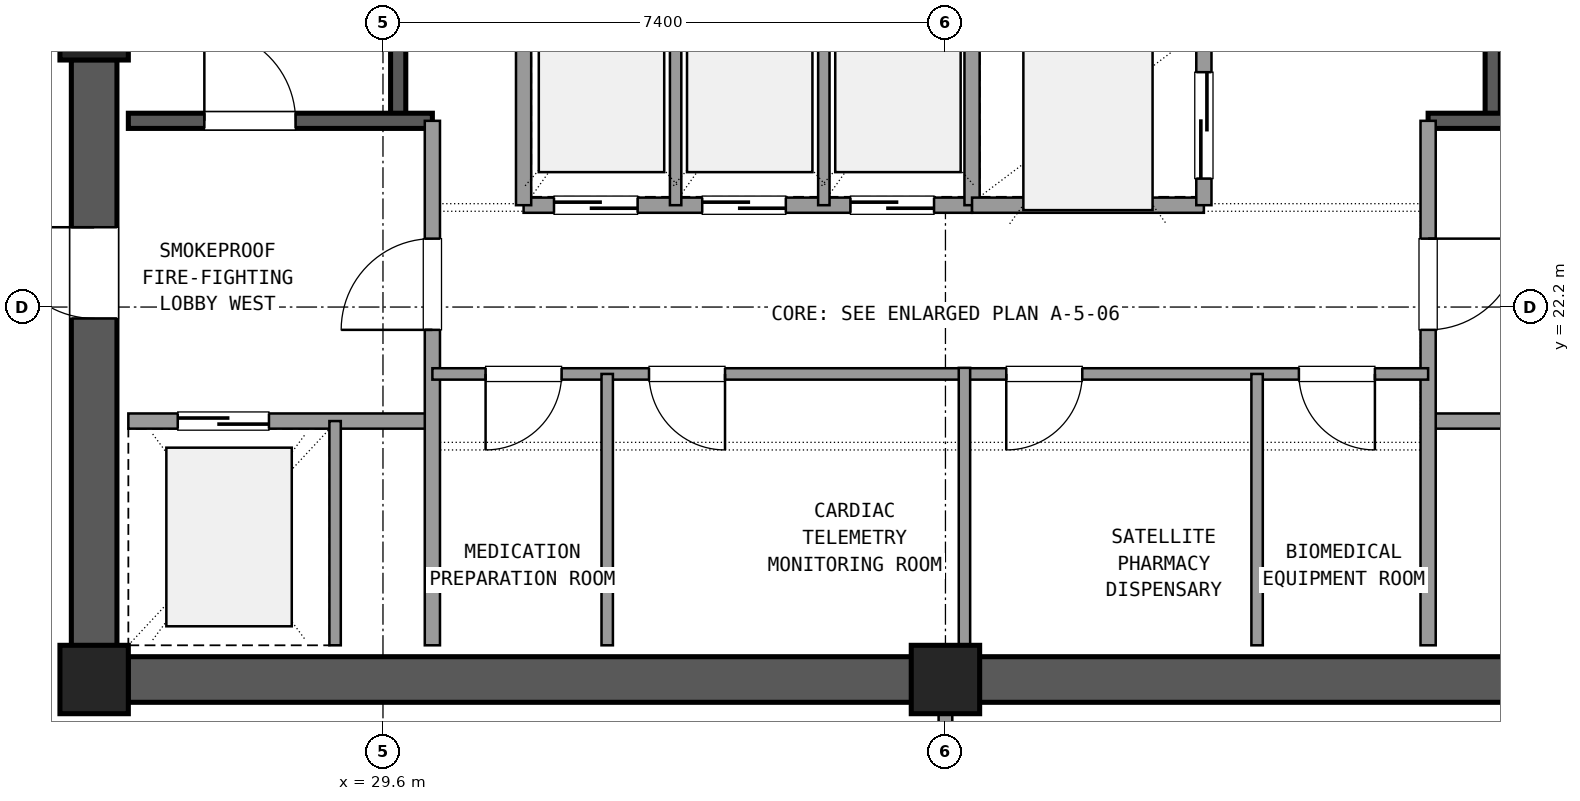
"""IFC4 building model, lengths in metres.
Left out: names, types, materials, properties, quantities, classifications, styles, units other than length and angle.
Written with IfcOpenShell. Run it as: python <this file> out.ifc"""

import sys

from ifc_helpers import new_model, si_unit, direction, frame, frame_2d, origin, origin_2d, place, context, subcontext, project, spatial, rectangle, extrude, element, fill, save


model = new_model("IFC4")
c1 = context("Model", 3, precision=1e-05, world=origin(), true_north=direction((0.0, 1.0)))
c2 = subcontext(c1, "Body", "Model", "MODEL_VIEW")
j1 = project(units=[si_unit("LENGTHUNIT", "METRE"), si_unit("PLANEANGLEUNIT", "RADIAN")], contexts=[c1])
p1 = place(None, origin())
s1 = spatial("IfcSite", under=j1, at=p1, CompositionType="ELEMENT")
p2 = place(p1, origin())
s2 = spatial("IfcBuilding", under=s1, at=p2, CompositionType="ELEMENT")
p3 = place(p2, frame((0.0, 0.0, 214.38)))
s3 = spatial("IfcBuildingStorey", under=s2, at=p3, CompositionType="ELEMENT", Elevation=214.38)
for number, where, z_axis, x_axis in (
    (1, (25.8, 17.3, 0.0), (0.0, 0.0, 1.0), (1.0, 0.0, 0.0)),
    (2, (37.0, 17.3, 0.0), (0.0, 0.0, 1.0), (1.0, 0.0, 0.0)),
    (3, (25.8, 25.9, 0.0), (0.0, 0.0, 1.0), (1.0, 0.0, 0.0)),
):
    element("IfcColumn", number, at=place(p3, frame(where, z_axis=z_axis, x_axis=x_axis)), inside=s3, PredefinedType="COLUMN", context=c2, shape_type="SweptSolid", body=[
        extrude(rectangle(XDim=0.9, YDim=0.9, at=origin_2d()), origin(), (0.0, 0.0, 1.0), 3.6),
    ])
for number, where, z_axis, x_axis in (
    (4, (26.245, 17.3, 0.0), (0.0, 0.0, 1.0), (1.0, 0.0, 0.0)),
    (5, (37.445, 17.3, 0.0), (0.0, 0.0, 1.0), (1.0, 0.0, 0.0)),
):
    element("IfcWall", number, at=place(p3, frame(where, z_axis=z_axis, x_axis=x_axis)), inside=s3, PredefinedType="SHEAR", context=c2, shape_type="SweptSolid", body=[
        extrude(rectangle(XDim=10.31, YDim=0.6, at=frame_2d((5.155, 0.0))), origin(), (0.0, 0.0, 1.0), 3.32),
    ])
p4 = place(p3, frame((25.8, 25.455, 0.0), z_axis=(0.0, 0.0, 1.0), x_axis=(0.0, -1.0, 0.0)))
e6 = element("IfcWall", 6, at=p4, inside=s3, PredefinedType="SHEAR", context=c2, shape_type="SweptSolid", body=[
    extrude(rectangle(XDim=7.71, YDim=0.6, at=frame_2d((3.855, 0.0))), origin(), (0.0, 0.0, 1.0), 3.32),
])
p5 = place(p4, frame((2.205, 0.0, 0.0)))
e7 = element("IfcOpeningElement", 7, at=p5, cuts=e6, PredefinedType="OPENING", context=c2, shape_type="SweptSolid", body=[
    extrude(rectangle(XDim=1.2, YDim=2.15, at=frame_2d((0.6, 1.075))), frame((0.0, 0.31, 0.0), z_axis=(0.0, -1.0, 0.0), x_axis=(1.0, 0.0, 0.0)), (0.0, 0.0, 1.0), 0.62),
])
p6 = place(p3, frame((29.8, 24.65, 0.0), z_axis=(0.0, 0.0, 1.0), x_axis=(0.0, 1.0, 0.0)))
e8 = element("IfcWall", 8, at=p6, inside=s3, PredefinedType="SHEAR", context=c2, shape_type="SweptSolid", body=[
    extrude(rectangle(XDim=9.4, YDim=0.2, at=frame_2d((4.7, 0.0))), origin(), (0.0, 0.0, 1.0), 3.32),
])
p7 = place(p3, frame((26.25, 24.65, 0.0), z_axis=(0.0, 0.0, 1.0), x_axis=(1.0, 0.0, 0.0)))
e9 = element("IfcWall", 9, at=p7, inside=s3, PredefinedType="SHEAR", context=c2, shape_type="SweptSolid", body=[
    extrude(rectangle(XDim=4.0, YDim=0.2, at=frame_2d((2.0, 0.0))), origin(), (0.0, 0.0, 1.0), 3.32),
])
p8 = place(p7, frame((1.0, 0.0, 0.0)))
e10 = element("IfcOpeningElement", 10, at=p8, cuts=e9, PredefinedType="OPENING", context=c2, shape_type="SweptSolid", body=[
    extrude(rectangle(XDim=1.2, YDim=2.15, at=frame_2d((0.6, 1.075))), frame((0.0, 0.11, 0.0), z_axis=(0.0, -1.0, 0.0), x_axis=(1.0, 0.0, 0.0)), (0.0, 0.0, 1.0), 0.22),
])
p9 = place(p3, frame((44.2, 24.65, 0.0), z_axis=(0.0, 0.0, 1.0), x_axis=(0.0, 1.0, 0.0)))
e11 = element("IfcWall", 11, at=p9, inside=s3, PredefinedType="SHEAR", context=c2, shape_type="SweptSolid", body=[
    extrude(rectangle(XDim=9.4, YDim=0.2, at=frame_2d((4.7, 0.0))), origin(), (0.0, 0.0, 1.0), 3.32),
])
p10 = place(p3, frame((43.35, 24.65, 0.0), z_axis=(0.0, 0.0, 1.0), x_axis=(1.0, 0.0, 0.0)))
e12 = element("IfcWall", 12, at=p10, inside=s3, PredefinedType="SHEAR", context=c2, shape_type="SweptSolid", body=[
    extrude(rectangle(XDim=4.4, YDim=0.2, at=frame_2d((2.2, 0.0))), origin(), (0.0, 0.0, 1.0), 3.32),
])
p11 = place(p10, frame((2.0, 0.0, 0.0)))
e13 = element("IfcOpeningElement", 13, at=p11, cuts=e12, PredefinedType="OPENING", context=c2, shape_type="SweptSolid", body=[
    extrude(rectangle(XDim=1.2, YDim=2.15, at=frame_2d((0.6, 1.075))), frame((0.0, 0.11, 0.0), z_axis=(0.0, -1.0, 0.0), x_axis=(1.0, 0.0, 0.0)), (0.0, 0.0, 1.0), 0.22),
])
p12 = place(p3, frame((26.25, 20.7, 0.0), z_axis=(0.0, 0.0, 1.0), x_axis=(1.0, 0.0, 0.0)))
e14 = element("IfcWall", 14, at=p12, inside=s3, PredefinedType="SOLIDWALL", context=c2, shape_type="SweptSolid", body=[
    extrude(rectangle(XDim=4.0, YDim=0.2, at=frame_2d((2.0, 0.0))), origin(), (0.0, 0.0, 1.0), 2.61),
])
p13 = place(p12, frame((0.65, 0.0, 0.0)))
e15 = element("IfcOpeningElement", 15, at=p13, cuts=e14, PredefinedType="OPENING", context=c2, shape_type="SweptSolid", body=[
    extrude(rectangle(XDim=1.2, YDim=2.15, at=frame_2d((0.6, 1.075))), frame((0.0, 0.11, 0.0), z_axis=(0.0, -1.0, 0.0), x_axis=(1.0, 0.0, 0.0)), (0.0, 0.0, 1.0), 0.22),
])
p14 = place(p3, frame((30.25, 17.75, 0.0), z_axis=(0.0, 0.0, 1.0), x_axis=(0.0, 1.0, 0.0)))
e16 = element("IfcWall", 16, at=p14, inside=s3, PredefinedType="SOLIDWALL", context=c2, shape_type="SweptSolid", body=[
    extrude(rectangle(XDim=6.9, YDim=0.2, at=frame_2d((3.45, 0.0))), origin(), (0.0, 0.0, 1.0), 2.61),
])
p15 = place(p14, frame((4.15, 0.0, 0.0)))
e17 = element("IfcOpeningElement", 17, at=p15, cuts=e16, PredefinedType="OPENING", context=c2, shape_type="SweptSolid", body=[
    extrude(rectangle(XDim=1.2, YDim=2.15, at=frame_2d((0.6, 1.075))), frame((0.0, 0.11, 0.0), z_axis=(0.0, -1.0, 0.0), x_axis=(1.0, 0.0, 0.0)), (0.0, 0.0, 1.0), 0.22),
])
p16 = place(p3, frame((28.97, 17.75, 0.0), z_axis=(0.0, 0.0, 1.0), x_axis=(0.0, 1.0, 0.0)))
e18 = element("IfcWall", 18, at=p16, inside=s3, PredefinedType="PARTITIONING", context=c2, shape_type="SweptSolid", body=[
    extrude(rectangle(XDim=2.95, YDim=0.15, at=frame_2d((1.475, 0.0))), origin(), (0.0, 0.0, 1.0), 2.61),
])
p17 = place(p3, frame((43.35, 20.7, 0.0), z_axis=(0.0, 0.0, 1.0), x_axis=(1.0, 0.0, 0.0)))
e19 = element("IfcWall", 19, at=p17, inside=s3, PredefinedType="SOLIDWALL", context=c2, shape_type="SweptSolid", body=[
    extrude(rectangle(XDim=4.4, YDim=0.2, at=frame_2d((2.2, 0.0))), origin(), (0.0, 0.0, 1.0), 2.61),
])
p18 = place(p17, frame((2.35, 0.0, 0.0)))
e20 = element("IfcOpeningElement", 20, at=p18, cuts=e19, PredefinedType="OPENING", context=c2, shape_type="SweptSolid", body=[
    extrude(rectangle(XDim=1.2, YDim=2.15, at=frame_2d((0.6, 1.075))), frame((0.0, 0.11, 0.0), z_axis=(0.0, -1.0, 0.0), x_axis=(1.0, 0.0, 0.0)), (0.0, 0.0, 1.0), 0.22),
])
p19 = place(p3, frame((43.35, 17.75, 0.0), z_axis=(0.0, 0.0, 1.0), x_axis=(0.0, 1.0, 0.0)))
e21 = element("IfcWall", 21, at=p19, inside=s3, PredefinedType="SOLIDWALL", context=c2, shape_type="SweptSolid", body=[
    extrude(rectangle(XDim=6.9, YDim=0.2, at=frame_2d((3.45, 0.0))), origin(), (0.0, 0.0, 1.0), 2.61),
])
p20 = place(p19, frame((4.15, 0.0, 0.0)))
e22 = element("IfcOpeningElement", 22, at=p20, cuts=e21, PredefinedType="OPENING", context=c2, shape_type="SweptSolid", body=[
    extrude(rectangle(XDim=1.2, YDim=2.15, at=frame_2d((0.6, 1.075))), frame((0.0, 0.11, 0.0), z_axis=(0.0, -1.0, 0.0), x_axis=(1.0, 0.0, 0.0)), (0.0, 0.0, 1.0), 0.22),
])
p21 = place(p3, frame((30.25, 21.32, 0.0), z_axis=(0.0, 0.0, 1.0), x_axis=(1.0, 0.0, 0.0)))
e23 = element("IfcWall", 23, at=p21, inside=s3, PredefinedType="PARTITIONING", context=c2, shape_type="SweptSolid", body=[
    extrude(rectangle(XDim=7.0, YDim=0.15, at=frame_2d((3.5, 0.0))), origin(), (0.0, 0.0, 1.0), 2.61),
])
p22 = place(p21, frame((0.7, 0.0, 0.0)))
e24 = element("IfcOpeningElement", 24, at=p22, cuts=e23, PredefinedType="OPENING", context=c2, shape_type="SweptSolid", body=[
    extrude(rectangle(XDim=1.0, YDim=2.15, at=frame_2d((0.5, 1.075))), frame((0.0, 0.085, 0.0), z_axis=(0.0, -1.0, 0.0), x_axis=(1.0, 0.0, 0.0)), (0.0, 0.0, 1.0), 0.17),
])
p23 = place(p21, frame((2.85, 0.0, 0.0)))
e25 = element("IfcOpeningElement", 25, at=p23, cuts=e23, PredefinedType="OPENING", context=c2, shape_type="SweptSolid", body=[
    extrude(rectangle(XDim=1.0, YDim=2.15, at=frame_2d((0.5, 1.075))), frame((0.0, 0.085, 0.0), z_axis=(0.0, -1.0, 0.0), x_axis=(1.0, 0.0, 0.0)), (0.0, 0.0, 1.0), 0.17),
])
p24 = place(p3, frame((32.55, 17.75, 0.0), z_axis=(0.0, 0.0, 1.0), x_axis=(0.0, 1.0, 0.0)))
e26 = element("IfcWall", 26, at=p24, inside=s3, PredefinedType="PARTITIONING", context=c2, shape_type="SweptSolid", body=[
    extrude(rectangle(XDim=3.57, YDim=0.15, at=frame_2d((1.785, 0.0))), origin(), (0.0, 0.0, 1.0), 2.61),
])
p25 = place(p3, frame((37.25, 21.32, 0.0), z_axis=(0.0, 0.0, 1.0), x_axis=(1.0, 0.0, 0.0)))
e27 = element("IfcWall", 27, at=p25, inside=s3, PredefinedType="PARTITIONING", context=c2, shape_type="SweptSolid", body=[
    extrude(rectangle(XDim=6.1, YDim=0.15, at=frame_2d((3.05, 0.0))), origin(), (0.0, 0.0, 1.0), 2.61),
])
p26 = place(p25, frame((0.55, 0.0, 0.0)))
e28 = element("IfcOpeningElement", 28, at=p26, cuts=e27, PredefinedType="OPENING", context=c2, shape_type="SweptSolid", body=[
    extrude(rectangle(XDim=1.0, YDim=2.15, at=frame_2d((0.5, 1.075))), frame((0.0, 0.085, 0.0), z_axis=(0.0, -1.0, 0.0), x_axis=(1.0, 0.0, 0.0)), (0.0, 0.0, 1.0), 0.17),
])
p27 = place(p25, frame((4.4, 0.0, 0.0)))
e29 = element("IfcOpeningElement", 29, at=p27, cuts=e27, PredefinedType="OPENING", context=c2, shape_type="SweptSolid", body=[
    extrude(rectangle(XDim=1.0, YDim=2.15, at=frame_2d((0.5, 1.075))), frame((0.0, 0.085, 0.0), z_axis=(0.0, -1.0, 0.0), x_axis=(1.0, 0.0, 0.0)), (0.0, 0.0, 1.0), 0.17),
])
p28 = place(p3, frame((41.1, 17.75, 0.0), z_axis=(0.0, 0.0, 1.0), x_axis=(0.0, 1.0, 0.0)))
e30 = element("IfcWall", 30, at=p28, inside=s3, PredefinedType="PARTITIONING", context=c2, shape_type="SweptSolid", body=[
    extrude(rectangle(XDim=3.57, YDim=0.15, at=frame_2d((1.785, 0.0))), origin(), (0.0, 0.0, 1.0), 2.61),
])
p29 = place(p3, frame((37.25, 17.75, 0.0), z_axis=(0.0, 0.0, 1.0), x_axis=(0.0, 1.0, 0.0)))
e31 = element("IfcWall", 31, at=p29, inside=s3, PredefinedType="PARTITIONING", context=c2, shape_type="SweptSolid", body=[
    extrude(rectangle(XDim=3.65, YDim=0.15, at=frame_2d((1.825, 0.0))), origin(), (0.0, 0.0, 1.0), 2.61),
])
p30 = place(p3, frame((31.45, 23.54, 0.0), z_axis=(0.0, 0.0, 1.0), x_axis=(1.0, 0.0, 0.0)))
e32 = element("IfcWall", 32, at=p30, inside=s3, PredefinedType="SOLIDWALL", context=c2, shape_type="SweptSolid", body=[
    extrude(rectangle(XDim=5.9, YDim=0.2, at=frame_2d((2.95, 0.0))), origin(), (0.0, 0.0, 1.0), 2.61),
])
p31 = place(p30, frame((0.4, 0.0, 0.0)))
e33 = element("IfcOpeningElement", 33, at=p31, cuts=e32, PredefinedType="OPENING", context=c2, shape_type="SweptSolid", body=[
    extrude(rectangle(XDim=1.1, YDim=2.15, at=frame_2d((0.55, 1.075))), frame((0.0, 0.11, 0.0), z_axis=(0.0, -1.0, 0.0), x_axis=(1.0, 0.0, 0.0)), (0.0, 0.0, 1.0), 0.22),
])
p32 = place(p30, frame((2.35, 0.0, 0.0)))
e34 = element("IfcOpeningElement", 34, at=p32, cuts=e32, PredefinedType="OPENING", context=c2, shape_type="SweptSolid", body=[
    extrude(rectangle(XDim=1.1, YDim=2.15, at=frame_2d((0.55, 1.075))), frame((0.0, 0.11, 0.0), z_axis=(0.0, -1.0, 0.0), x_axis=(1.0, 0.0, 0.0)), (0.0, 0.0, 1.0), 0.22),
])
p33 = place(p30, frame((4.3, 0.0, 0.0)))
e35 = element("IfcOpeningElement", 35, at=p33, cuts=e32, PredefinedType="OPENING", context=c2, shape_type="SweptSolid", body=[
    extrude(rectangle(XDim=1.1, YDim=2.15, at=frame_2d((0.55, 1.075))), frame((0.0, 0.11, 0.0), z_axis=(0.0, -1.0, 0.0), x_axis=(1.0, 0.0, 0.0)), (0.0, 0.0, 1.0), 0.22),
])
p34 = place(p3, frame((31.45, 23.54, 0.0), z_axis=(0.0, 0.0, 1.0), x_axis=(0.0, 1.0, 0.0)))
e36 = element("IfcWall", 36, at=p34, inside=s3, PredefinedType="SOLIDWALL", context=c2, shape_type="SweptSolid", body=[
    extrude(rectangle(XDim=2.81, YDim=0.2, at=frame_2d((1.405, 0.0))), origin(), (0.0, 0.0, 1.0), 2.61),
])
for number, where, z_axis, x_axis in (
    (37, (33.45, 23.54, 0.0), (0.0, 0.0, 1.0), (0.0, 1.0, 0.0)),
    (38, (35.4, 23.54, 0.0), (0.0, 0.0, 1.0), (0.0, 1.0, 0.0)),
):
    element("IfcWall", number, at=place(p3, frame(where, z_axis=z_axis, x_axis=x_axis)), inside=s3, PredefinedType="PARTITIONING", context=c2, shape_type="SweptSolid", body=[
        extrude(rectangle(XDim=2.81, YDim=0.15, at=frame_2d((1.405, 0.0))), origin(), (0.0, 0.0, 1.0), 2.61),
    ])
p35 = place(p3, frame((37.35, 23.54, 0.0), z_axis=(0.0, 0.0, 1.0), x_axis=(0.0, 1.0, 0.0)))
e39 = element("IfcWall", 39, at=p35, inside=s3, PredefinedType="SOLIDWALL", context=c2, shape_type="SweptSolid", body=[
    extrude(rectangle(XDim=6.82, YDim=0.2, at=frame_2d((3.41, 0.0))), origin(), (0.0, 0.0, 1.0), 2.61),
])
p36 = place(p3, frame((37.35, 23.54, 0.0), z_axis=(0.0, 0.0, 1.0), x_axis=(1.0, 0.0, 0.0)))
e40 = element("IfcWall", 40, at=p36, inside=s3, PredefinedType="SOLIDWALL", context=c2, shape_type="SweptSolid", body=[
    extrude(rectangle(XDim=3.05, YDim=0.2, at=frame_2d((1.525, 0.0))), origin(), (0.0, 0.0, 1.0), 2.61),
])
p37 = place(p3, frame((40.4, 23.54, 0.0), z_axis=(0.0, 0.0, 1.0), x_axis=(0.0, 1.0, 0.0)))
e41 = element("IfcWall", 41, at=p37, inside=s3, PredefinedType="SOLIDWALL", context=c2, shape_type="SweptSolid", body=[
    extrude(rectangle(XDim=6.82, YDim=0.2, at=frame_2d((3.41, 0.0))), origin(), (0.0, 0.0, 1.0), 2.61),
])
p38 = place(p37, frame((0.35, 0.0, 0.0)))
e42 = element("IfcOpeningElement", 42, at=p38, cuts=e41, PredefinedType="OPENING", context=c2, shape_type="SweptSolid", body=[
    extrude(rectangle(XDim=1.4, YDim=2.2, at=frame_2d((0.7, 1.1))), frame((0.0, 0.11, 0.0), z_axis=(0.0, -1.0, 0.0), x_axis=(1.0, 0.0, 0.0)), (0.0, 0.0, 1.0), 0.22),
])
p39 = place(p37, frame((2.65, 0.0, 0.0)))
e43 = element("IfcOpeningElement", 43, at=p39, cuts=e41, PredefinedType="OPENING", context=c2, shape_type="SweptSolid", body=[
    extrude(rectangle(XDim=1.4, YDim=2.2, at=frame_2d((0.7, 1.1))), frame((0.0, 0.11, 0.0), z_axis=(0.0, -1.0, 0.0), x_axis=(1.0, 0.0, 0.0)), (0.0, 0.0, 1.0), 0.22),
])
p40 = place(p37, frame((4.85, 0.0, 0.0)))
e44 = element("IfcOpeningElement", 44, at=p40, cuts=e41, PredefinedType="OPENING", context=c2, shape_type="SweptSolid", body=[
    extrude(rectangle(XDim=1.4, YDim=2.2, at=frame_2d((0.7, 1.1))), frame((0.0, 0.11, 0.0), z_axis=(0.0, -1.0, 0.0), x_axis=(1.0, 0.0, 0.0)), (0.0, 0.0, 1.0), 0.22),
])
p41 = place(p3, frame((37.0, 14.15, 0.0), z_axis=(0.0, 0.0, 1.0), x_axis=(0.0, 1.0, 0.0)))
e45 = element("IfcWall", 45, at=p41, inside=s3, PredefinedType="PARTITIONING", context=c2, shape_type="SweptSolid", body=[
    extrude(rectangle(XDim=2.7, YDim=0.18, at=frame_2d((1.35, 0.0))), origin(), (0.0, 0.0, 1.0), 2.61),
])
p42 = place(p41, frame((0.35, 0.0, 0.0)))
e46 = element("IfcOpeningElement", 46, at=p42, cuts=e45, PredefinedType="OPENING", context=c2, shape_type="SweptSolid", body=[
    extrude(rectangle(XDim=2.0, YDim=2.2, at=frame_2d((1.0, 1.1))), frame((0.0, 0.1, 0.0), z_axis=(0.0, -1.0, 0.0), x_axis=(1.0, 0.0, 0.0)), (0.0, 0.0, 1.0), 0.2),
])
p43 = place(p8, origin())
e47 = element("IfcDoor", 47, at=p43, inside=s3, OperationType="SINGLE_SWING_LEFT", PredefinedType="DOOR", context=c2, shape_type="SweptSolid", body=[
    extrude(rectangle(XDim=1.2, YDim=2.15, at=frame_2d((0.6, 1.075))), frame((0.0, 0.025, 0.0), z_axis=(0.0, -1.0, 0.0), x_axis=(1.0, 0.0, 0.0)), (0.0, 0.0, 1.0), 0.05),
])
fill(e10, e47)
p44 = place(p13, origin())
e48 = element("IfcDoor", 48, at=p44, inside=s3, OperationType="SLIDING_TO_LEFT", PredefinedType="DOOR", context=c2, shape_type="SweptSolid", body=[
    extrude(rectangle(XDim=1.2, YDim=2.15, at=frame_2d((0.6, 1.075))), frame((0.0, 0.025, 0.0), z_axis=(0.0, -1.0, 0.0), x_axis=(1.0, 0.0, 0.0)), (0.0, 0.0, 1.0), 0.05),
])
fill(e15, e48)
p45 = place(p15, origin())
e49 = element("IfcDoor", 49, at=p45, inside=s3, OperationType="SINGLE_SWING_LEFT", PredefinedType="DOOR", context=c2, shape_type="SweptSolid", body=[
    extrude(rectangle(XDim=1.2, YDim=2.15, at=frame_2d((0.6, 1.075))), frame((0.0, 0.025, 0.0), z_axis=(0.0, -1.0, 0.0), x_axis=(1.0, 0.0, 0.0)), (0.0, 0.0, 1.0), 0.05),
])
fill(e17, e49)
p46 = place(p20, frame((1.2, 0.0, 0.0), z_axis=(0.0, 0.0, 1.0), x_axis=(-1.0, 0.0, 0.0)))
e50 = element("IfcDoor", 50, at=p46, inside=s3, OperationType="SINGLE_SWING_RIGHT", PredefinedType="DOOR", context=c2, shape_type="SweptSolid", body=[
    extrude(rectangle(XDim=1.2, YDim=2.15, at=frame_2d((0.6, 1.075))), frame((0.0, 0.025, 0.0), z_axis=(0.0, -1.0, 0.0), x_axis=(1.0, 0.0, 0.0)), (0.0, 0.0, 1.0), 0.05),
])
fill(e22, e50)
p47 = place(p5, frame((1.2, 0.0, 0.0), z_axis=(0.0, 0.0, 1.0), x_axis=(-1.0, 0.0, 0.0)))
e51 = element("IfcDoor", 51, at=p47, inside=s3, OperationType="SINGLE_SWING_LEFT", PredefinedType="DOOR", context=c2, shape_type="SweptSolid", body=[
    extrude(rectangle(XDim=1.2, YDim=2.15, at=frame_2d((0.6, 1.075))), frame((0.0, 0.025, 0.0), z_axis=(0.0, -1.0, 0.0), x_axis=(1.0, 0.0, 0.0)), (0.0, 0.0, 1.0), 0.05),
])
fill(e7, e51)
p48 = place(p22, frame((1.0, 0.0, 0.0), z_axis=(0.0, 0.0, 1.0), x_axis=(-1.0, 0.0, 0.0)))
e52 = element("IfcDoor", 52, at=p48, inside=s3, OperationType="SINGLE_SWING_LEFT", PredefinedType="DOOR", context=c2, shape_type="SweptSolid", body=[
    extrude(rectangle(XDim=1.0, YDim=2.15, at=frame_2d((0.5, 1.075))), frame((0.0, 0.025, 0.0), z_axis=(0.0, -1.0, 0.0), x_axis=(1.0, 0.0, 0.0)), (0.0, 0.0, 1.0), 0.05),
])
fill(e24, e52)
p49 = place(p23, frame((1.0, 0.0, 0.0), z_axis=(0.0, 0.0, 1.0), x_axis=(-1.0, 0.0, 0.0)))
e53 = element("IfcDoor", 53, at=p49, inside=s3, OperationType="SINGLE_SWING_RIGHT", PredefinedType="DOOR", context=c2, shape_type="SweptSolid", body=[
    extrude(rectangle(XDim=1.0, YDim=2.15, at=frame_2d((0.5, 1.075))), frame((0.0, 0.025, 0.0), z_axis=(0.0, -1.0, 0.0), x_axis=(1.0, 0.0, 0.0)), (0.0, 0.0, 1.0), 0.05),
])
fill(e25, e53)
p50 = place(p26, frame((1.0, 0.0, 0.0), z_axis=(0.0, 0.0, 1.0), x_axis=(-1.0, 0.0, 0.0)))
e54 = element("IfcDoor", 54, at=p50, inside=s3, OperationType="SINGLE_SWING_LEFT", PredefinedType="DOOR", context=c2, shape_type="SweptSolid", body=[
    extrude(rectangle(XDim=1.0, YDim=2.15, at=frame_2d((0.5, 1.075))), frame((0.0, 0.025, 0.0), z_axis=(0.0, -1.0, 0.0), x_axis=(1.0, 0.0, 0.0)), (0.0, 0.0, 1.0), 0.05),
])
fill(e28, e54)
p51 = place(p27, frame((1.0, 0.0, 0.0), z_axis=(0.0, 0.0, 1.0), x_axis=(-1.0, 0.0, 0.0)))
e55 = element("IfcDoor", 55, at=p51, inside=s3, OperationType="SINGLE_SWING_RIGHT", PredefinedType="DOOR", context=c2, shape_type="SweptSolid", body=[
    extrude(rectangle(XDim=1.0, YDim=2.15, at=frame_2d((0.5, 1.075))), frame((0.0, 0.025, 0.0), z_axis=(0.0, -1.0, 0.0), x_axis=(1.0, 0.0, 0.0)), (0.0, 0.0, 1.0), 0.05),
])
fill(e29, e55)
p52 = place(p31, origin())
e56 = element("IfcDoor", 56, at=p52, inside=s3, OperationType="SLIDING_TO_RIGHT", PredefinedType="DOOR", context=c2, shape_type="SweptSolid", body=[
    extrude(rectangle(XDim=1.1, YDim=2.15, at=frame_2d((0.55, 1.075))), frame((0.0, 0.025, 0.0), z_axis=(0.0, -1.0, 0.0), x_axis=(1.0, 0.0, 0.0)), (0.0, 0.0, 1.0), 0.05),
])
fill(e33, e56)
p53 = place(p32, origin())
e57 = element("IfcDoor", 57, at=p53, inside=s3, OperationType="SLIDING_TO_RIGHT", PredefinedType="DOOR", context=c2, shape_type="SweptSolid", body=[
    extrude(rectangle(XDim=1.1, YDim=2.15, at=frame_2d((0.55, 1.075))), frame((0.0, 0.025, 0.0), z_axis=(0.0, -1.0, 0.0), x_axis=(1.0, 0.0, 0.0)), (0.0, 0.0, 1.0), 0.05),
])
fill(e34, e57)
p54 = place(p33, origin())
e58 = element("IfcDoor", 58, at=p54, inside=s3, OperationType="SLIDING_TO_RIGHT", PredefinedType="DOOR", context=c2, shape_type="SweptSolid", body=[
    extrude(rectangle(XDim=1.1, YDim=2.15, at=frame_2d((0.55, 1.075))), frame((0.0, 0.025, 0.0), z_axis=(0.0, -1.0, 0.0), x_axis=(1.0, 0.0, 0.0)), (0.0, 0.0, 1.0), 0.05),
])
fill(e35, e58)
p55 = place(p38, origin())
e59 = element("IfcDoor", 59, at=p55, inside=s3, OperationType="SLIDING_TO_LEFT", PredefinedType="DOOR", context=c2, shape_type="SweptSolid", body=[
    extrude(rectangle(XDim=1.4, YDim=2.2, at=frame_2d((0.7, 1.1))), frame((0.0, 0.025, 0.0), z_axis=(0.0, -1.0, 0.0), x_axis=(1.0, 0.0, 0.0)), (0.0, 0.0, 1.0), 0.05),
])
fill(e42, e59)
save(model, sys.argv[1])
